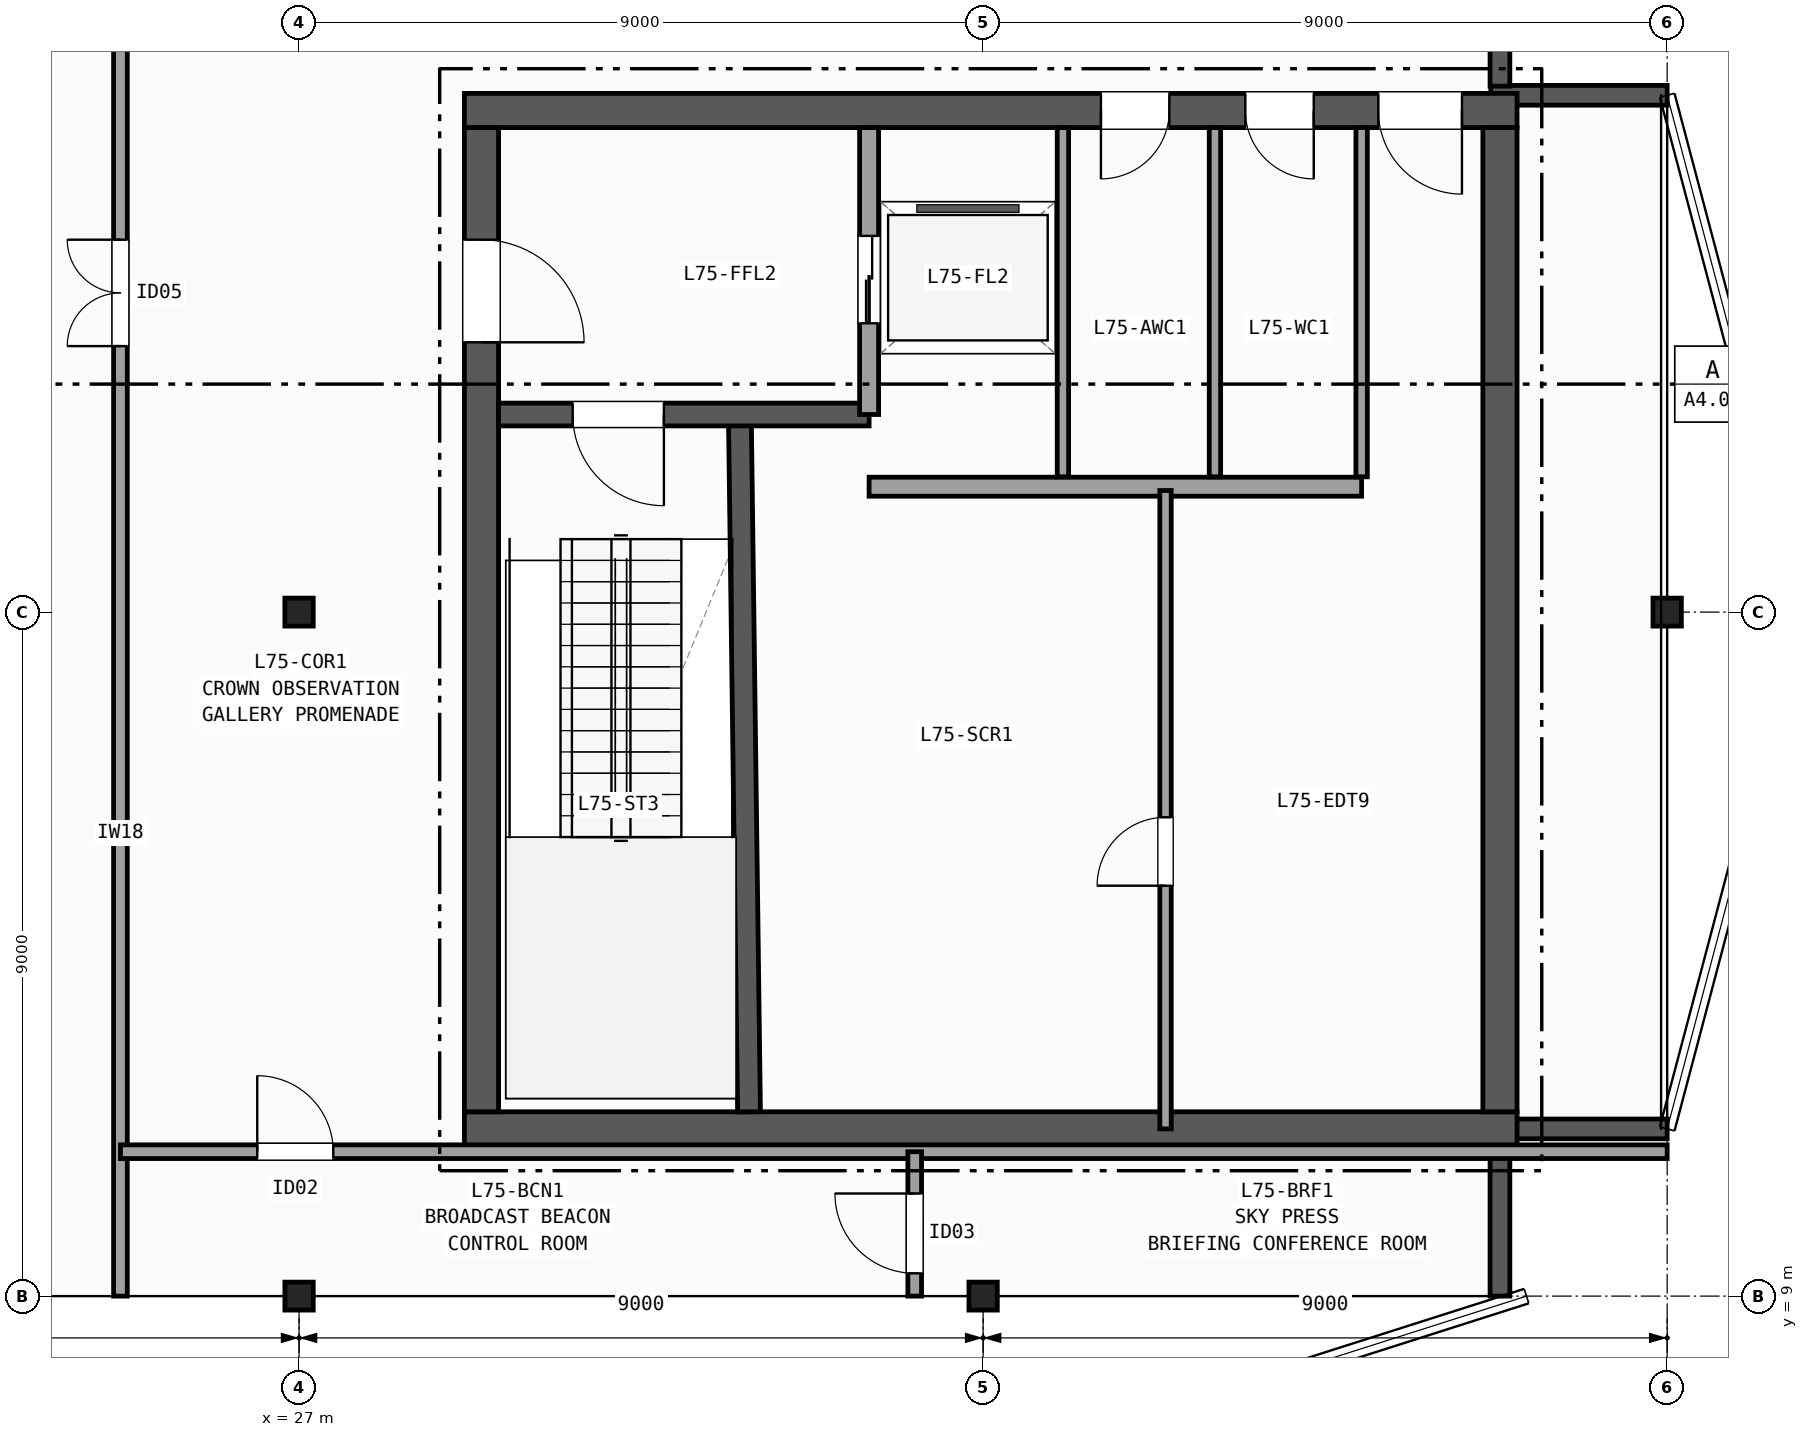
"""IFC4 building model, lengths in metres.
Left out: names, types, materials, properties, quantities, classifications, styles, units other than length and angle.
Written with IfcOpenShell. Run it as: python <this file> out.ifc"""

import sys

from ifc_helpers import new_model, si_unit, direction, frame, frame_2d, origin, origin_2d, place, context, subcontext, project, spatial, rectangle, i_section, extrude, element, fill, save


model = new_model("IFC4")
c1 = context("Model", 3, precision=1e-05, world=origin(), true_north=direction((0.0, 1.0)))
c2 = subcontext(c1, "Body", "Model", "MODEL_VIEW")
j1 = project(units=[si_unit("LENGTHUNIT", "METRE"), si_unit("PLANEANGLEUNIT", "RADIAN")], contexts=[c1])
p1 = place(None, origin())
s1 = spatial("IfcSite", under=j1, at=p1, CompositionType="ELEMENT")
p2 = place(p1, origin())
s2 = spatial("IfcBuilding", under=s1, at=p2, CompositionType="ELEMENT")
p3 = place(p2, frame((0.0, 0.0, 297.4)))
s3 = spatial("IfcBuildingStorey", under=s2, at=p3, CompositionType="ELEMENT", Elevation=297.4)
for number, where, z_axis, x_axis in (
    (1, (27.0, 9.0, 0.0), (0.0, 0.0, 1.0), (1.0, 0.0, 0.0)),
    (2, (27.0, 18.0, 0.0), (0.0, 0.0, 1.0), (1.0, 0.0, 0.0)),
    (3, (36.0, 9.0, 0.0), (0.0, 0.0, 1.0), (1.0, 0.0, 0.0)),
    (4, (45.0, 18.0, 0.0), (0.0, 0.0, 1.0), (1.0, 0.0, 0.0)),
):
    element("IfcColumn", number, at=place(p3, frame(where, z_axis=z_axis, x_axis=x_axis)), inside=s3, PredefinedType="COLUMN", context=c2, shape_type="SweptSolid", body=[
        extrude(i_section(OverallWidth=0.373, OverallDepth=0.368, WebThickness=0.015, FlangeThickness=0.024, FilletRadius=0.015, at=origin_2d()), origin(), (0.0, 0.0, 1.0), 5.2),
    ])
p4 = place(p3, frame((42.8, 9.0, 0.0), z_axis=(0.0, 0.0, 1.0), x_axis=(0.0, 1.0, 0.0)))
e5 = element("IfcWall", 5, at=p4, inside=s3, PredefinedType="SOLIDWALL", context=c2, shape_type="SweptSolid", body=[
    extrude(rectangle(XDim=2.08, YDim=0.26, at=frame_2d((1.04, 0.0))), origin(), (0.0, 0.0, 1.0), 4.87),
])
for number, where, z_axis, x_axis in (
    (6, (42.68, 11.2, 0.0), (0.0, 0.0, 1.0), (1.0, 0.0, 0.0)),
    (7, (45.0, 24.8, 0.0), (0.0, 0.0, 1.0), (-1.0, 0.0, 0.0)),
):
    element("IfcWall", number, at=place(p3, frame(where, z_axis=z_axis, x_axis=x_axis)), inside=s3, PredefinedType="SOLIDWALL", context=c2, shape_type="SweptSolid", body=[
        extrude(rectangle(XDim=2.32, YDim=0.26, at=frame_2d((1.16, 0.0))), origin(), (0.0, 0.0, 1.0), 4.87),
    ])
p5 = place(p3, frame((42.8, 24.92, 0.0), z_axis=(0.0, 0.0, 1.0), x_axis=(0.0, 1.0, 0.0)))
e8 = element("IfcWall", 8, at=p5, inside=s3, PredefinedType="SOLIDWALL", context=c2, shape_type="SweptSolid", body=[
    extrude(rectangle(XDim=2.08, YDim=0.26, at=frame_2d((1.04, 0.0))), origin(), (0.0, 0.0, 1.0), 4.87),
])
p6 = place(p3, frame((29.175, 11.2, 0.0), z_axis=(0.0, 0.0, 1.0), x_axis=(1.0, 0.0, 0.0)))
e9 = element("IfcWall", 9, at=p6, inside=s3, PredefinedType="SHEAR", context=c2, shape_type="SweptSolid", body=[
    extrude(rectangle(XDim=13.85, YDim=0.45, at=frame_2d((6.925, 0.0))), origin(), (0.0, 0.0, 1.0), 4.87),
])
p7 = place(p3, frame((43.025, 24.6, 0.0), z_axis=(0.0, 0.0, 1.0), x_axis=(-1.0, 0.0, 0.0)))
e10 = element("IfcWall", 10, at=p7, inside=s3, PredefinedType="SHEAR", context=c2, shape_type="SweptSolid", body=[
    extrude(rectangle(XDim=13.85, YDim=0.45, at=frame_2d((6.925, 0.0))), origin(), (0.0, 0.0, 1.0), 4.87),
])
p8 = place(p7, frame((0.725, 0.0, 0.0)))
e11 = element("IfcOpeningElement", 11, at=p8, cuts=e10, PredefinedType="OPENING", context=c2, shape_type="SweptSolid", body=[
    extrude(rectangle(XDim=1.1, YDim=2.15, at=frame_2d((0.55, 1.075))), frame((0.0, 0.235, 0.0), z_axis=(0.0, -1.0, 0.0), x_axis=(1.0, 0.0, 0.0)), (0.0, 0.0, 1.0), 0.47),
])
p9 = place(p7, frame((2.675, 0.0, 0.0)))
e12 = element("IfcOpeningElement", 12, at=p9, cuts=e10, PredefinedType="OPENING", context=c2, shape_type="SweptSolid", body=[
    extrude(rectangle(XDim=0.9, YDim=2.1, at=frame_2d((0.45, 1.05))), frame((0.0, 0.235, 0.0), z_axis=(0.0, -1.0, 0.0), x_axis=(1.0, 0.0, 0.0)), (0.0, 0.0, 1.0), 0.47),
])
p10 = place(p7, frame((4.575, 0.0, 0.0)))
e13 = element("IfcOpeningElement", 13, at=p10, cuts=e10, PredefinedType="OPENING", context=c2, shape_type="SweptSolid", body=[
    extrude(rectangle(XDim=0.9, YDim=2.1, at=frame_2d((0.45, 1.05))), frame((0.0, 0.235, 0.0), z_axis=(0.0, -1.0, 0.0), x_axis=(1.0, 0.0, 0.0)), (0.0, 0.0, 1.0), 0.47),
])
p11 = place(p3, frame((29.4, 24.375, 0.0), z_axis=(0.0, 0.0, 1.0), x_axis=(0.0, -1.0, 0.0)))
e14 = element("IfcWall", 14, at=p11, inside=s3, PredefinedType="SHEAR", context=c2, shape_type="SweptSolid", body=[
    extrude(rectangle(XDim=12.95, YDim=0.45, at=frame_2d((6.475, 0.0))), origin(), (0.0, 0.0, 1.0), 4.87),
])
p12 = place(p11, frame((1.475, 0.0, 0.0)))
e15 = element("IfcOpeningElement", 15, at=p12, cuts=e14, PredefinedType="OPENING", context=c2, shape_type="SweptSolid", body=[
    extrude(rectangle(XDim=1.35, YDim=2.15, at=frame_2d((0.675, 1.075))), frame((0.0, 0.235, 0.0), z_axis=(0.0, -1.0, 0.0), x_axis=(1.0, 0.0, 0.0)), (0.0, 0.0, 1.0), 0.47),
])
p13 = place(p3, frame((42.8, 11.425, 0.0), z_axis=(0.0, 0.0, 1.0), x_axis=(0.0, 1.0, 0.0)))
e16 = element("IfcWall", 16, at=p13, inside=s3, PredefinedType="SHEAR", context=c2, shape_type="SweptSolid", body=[
    extrude(rectangle(XDim=12.95, YDim=0.45, at=frame_2d((6.475, 0.0))), origin(), (0.0, 0.0, 1.0), 4.87),
])
p14 = place(p3, frame((32.92, 11.425, 0.0), z_axis=(0.0, 0.0, 1.0), x_axis=(-0.013135638869, 0.999913723774, 0.0)))
e17 = element("IfcWall", 17, at=p14, inside=s3, PredefinedType="SHEAR", context=c2, shape_type="SweptSolid", body=[
    extrude(rectangle(XDim=9.126, YDim=0.3, at=frame_2d((4.563, 0.0))), origin(), (0.0, 0.0, 1.0), 4.87),
])
p15 = place(p3, frame((34.5, 20.6, 0.0), z_axis=(0.0, 0.0, 1.0), x_axis=(-1.0, 0.0, 0.0)))
e18 = element("IfcWall", 18, at=p15, inside=s3, PredefinedType="SHEAR", context=c2, shape_type="SweptSolid", body=[
    extrude(rectangle(XDim=4.875, YDim=0.3, at=frame_2d((2.438, 0.0))), origin(), (0.0, 0.0, 1.0), 4.87),
])
p16 = place(p15, frame((2.7, 0.0, 0.0)))
e19 = element("IfcOpeningElement", 19, at=p16, cuts=e18, PredefinedType="OPENING", context=c2, shape_type="SweptSolid", body=[
    extrude(rectangle(XDim=1.2, YDim=2.15, at=frame_2d((0.6, 1.075))), frame((0.0, 0.16, 0.0), z_axis=(0.0, -1.0, 0.0), x_axis=(1.0, 0.0, 0.0)), (0.0, 0.0, 1.0), 0.32),
])
p17 = place(p3, frame((34.5, 20.6, 0.0), z_axis=(0.0, 0.0, 1.0), x_axis=(0.0, 1.0, 0.0)))
e20 = element("IfcWall", 20, at=p17, inside=s3, PredefinedType="PARTITIONING", context=c2, shape_type="SweptSolid", body=[
    extrude(rectangle(XDim=3.775, YDim=0.25, at=frame_2d((1.887, 0.0))), origin(), (0.0, 0.0, 1.0), 4.87),
])
p18 = place(p17, frame((1.2, 0.0, 0.0)))
e21 = element("IfcOpeningElement", 21, at=p18, cuts=e20, PredefinedType="OPENING", context=c2, shape_type="SweptSolid", body=[
    extrude(rectangle(XDim=1.15, YDim=2.15, at=frame_2d((0.575, 1.075))), frame((0.0, 0.135, 0.0), z_axis=(0.0, -1.0, 0.0), x_axis=(1.0, 0.0, 0.0)), (0.0, 0.0, 1.0), 0.27),
])
p19 = place(p3, frame((34.5, 19.65, 0.0), z_axis=(0.0, 0.0, 1.0), x_axis=(1.0, 0.0, 0.0)))
e22 = element("IfcWall", 22, at=p19, inside=s3, PredefinedType="PARTITIONING", context=c2, shape_type="SweptSolid", body=[
    extrude(rectangle(XDim=6.48, YDim=0.25, at=frame_2d((3.24, 0.0))), origin(), (0.0, 0.0, 1.0), 4.87),
])
p20 = place(p3, frame((38.4, 11.2, 0.0), z_axis=(0.0, 0.0, 1.0), x_axis=(0.0, 1.0, 0.0)))
e23 = element("IfcWall", 23, at=p20, inside=s3, PredefinedType="PARTITIONING", context=c2, shape_type="SweptSolid", body=[
    extrude(rectangle(XDim=8.4, YDim=0.15, at=frame_2d((4.2, 0.0))), origin(), (0.0, 0.0, 1.0), 4.87),
])
p21 = place(p20, frame((3.2, 0.0, 0.0)))
e24 = element("IfcOpeningElement", 24, at=p21, cuts=e23, PredefinedType="OPENING", context=c2, shape_type="SweptSolid", body=[
    extrude(rectangle(XDim=0.9, YDim=2.1, at=frame_2d((0.45, 1.05))), frame((0.0, 0.085, 0.0), z_axis=(0.0, -1.0, 0.0), x_axis=(1.0, 0.0, 0.0)), (0.0, 0.0, 1.0), 0.17),
])
for number, where, z_axis, x_axis in (
    (25, (37.05, 19.78, 0.0), (0.0, 0.0, 1.0), (0.0, 1.0, 0.0)),
    (26, (39.05, 19.78, 0.0), (0.0, 0.0, 1.0), (0.0, 1.0, 0.0)),
    (27, (40.98, 19.78, 0.0), (0.0, 0.0, 1.0), (0.0, 1.0, 0.0)),
):
    element("IfcWall", number, at=place(p3, frame(where, z_axis=z_axis, x_axis=x_axis)), inside=s3, PredefinedType="PARTITIONING", context=c2, shape_type="SweptSolid", body=[
        extrude(rectangle(XDim=4.595, YDim=0.15, at=frame_2d((2.297, 0.0))), origin(), (0.0, 0.0, 1.0), 4.87),
    ])
p22 = place(p3, frame((24.65, 9.0, 0.0), z_axis=(0.0, 0.0, 1.0), x_axis=(0.0, 1.0, 0.0)))
e28 = element("IfcWall", 28, at=p22, inside=s3, PredefinedType="PARTITIONING", context=c2, shape_type="SweptSolid", body=[
    extrude(rectangle(XDim=19.2, YDim=0.18, at=frame_2d((9.6, 0.0))), origin(), (0.0, 0.0, 1.0), 4.157),
])
p23 = place(p22, frame((12.5, 0.0, 0.0)))
e29 = element("IfcOpeningElement", 29, at=p23, cuts=e28, PredefinedType="OPENING", context=c2, shape_type="SweptSolid", body=[
    extrude(rectangle(XDim=1.4, YDim=2.15, at=frame_2d((0.7, 1.075))), frame((0.0, 0.1, 0.0), z_axis=(0.0, -1.0, 0.0), x_axis=(1.0, 0.0, 0.0)), (0.0, 0.0, 1.0), 0.2),
])
p24 = place(p3, frame((24.65, 10.9, 0.0), z_axis=(0.0, 0.0, 1.0), x_axis=(1.0, 0.0, 0.0)))
e30 = element("IfcWall", 30, at=p24, inside=s3, PredefinedType="PARTITIONING", context=c2, shape_type="SweptSolid", body=[
    extrude(rectangle(XDim=20.35, YDim=0.18, at=frame_2d((10.175, 0.0))), origin(), (0.0, 0.0, 1.0), 4.239),
])
p25 = place(p24, frame((1.8, 0.0, 0.0)))
e31 = element("IfcOpeningElement", 31, at=p25, cuts=e30, PredefinedType="OPENING", context=c2, shape_type="SweptSolid", body=[
    extrude(rectangle(XDim=1.0, YDim=2.1, at=frame_2d((0.5, 1.05))), frame((0.0, 0.1, 0.0), z_axis=(0.0, -1.0, 0.0), x_axis=(1.0, 0.0, 0.0)), (0.0, 0.0, 1.0), 0.2),
])
p26 = place(p3, frame((35.1, 9.0, 0.0), z_axis=(0.0, 0.0, 1.0), x_axis=(0.0, 1.0, 0.0)))
e32 = element("IfcWall", 32, at=p26, inside=s3, PredefinedType="PARTITIONING", context=c2, shape_type="SweptSolid", body=[
    extrude(rectangle(XDim=1.9, YDim=0.18, at=frame_2d((0.95, 0.0))), origin(), (0.0, 0.0, 1.0), 4.157),
])
p27 = place(p26, frame((0.3, 0.0, 0.0)))
e33 = element("IfcOpeningElement", 33, at=p27, cuts=e32, PredefinedType="OPENING", context=c2, shape_type="SweptSolid", body=[
    extrude(rectangle(XDim=1.05, YDim=2.15, at=frame_2d((0.525, 1.075))), frame((0.0, 0.1, 0.0), z_axis=(0.0, -1.0, 0.0), x_axis=(1.0, 0.0, 0.0)), (0.0, 0.0, 1.0), 0.2),
])
p28 = place(p16, origin())
e34 = element("IfcDoor", 34, at=p28, inside=s3, OperationType="SINGLE_SWING_LEFT", PredefinedType="DOOR", context=c2, shape_type="SweptSolid", body=[
    extrude(rectangle(XDim=1.2, YDim=2.15, at=frame_2d((0.6, 1.075))), frame((0.0, 0.025, 0.0), z_axis=(0.0, -1.0, 0.0), x_axis=(1.0, 0.0, 0.0)), (0.0, 0.0, 1.0), 0.05),
])
fill(e19, e34)
p29 = place(p12, origin())
e35 = element("IfcDoor", 35, at=p29, inside=s3, OperationType="SINGLE_SWING_RIGHT", PredefinedType="DOOR", context=c2, shape_type="SweptSolid", body=[
    extrude(rectangle(XDim=1.35, YDim=2.15, at=frame_2d((0.675, 1.075))), frame((0.0, 0.025, 0.0), z_axis=(0.0, -1.0, 0.0), x_axis=(1.0, 0.0, 0.0)), (0.0, 0.0, 1.0), 0.05),
])
fill(e15, e35)
p30 = place(p8, origin())
e36 = element("IfcDoor", 36, at=p30, inside=s3, OperationType="SINGLE_SWING_LEFT", PredefinedType="DOOR", context=c2, shape_type="SweptSolid", body=[
    extrude(rectangle(XDim=1.1, YDim=2.15, at=frame_2d((0.55, 1.075))), frame((0.0, 0.025, 0.0), z_axis=(0.0, -1.0, 0.0), x_axis=(1.0, 0.0, 0.0)), (0.0, 0.0, 1.0), 0.05),
])
fill(e11, e36)
p31 = place(p9, origin())
e37 = element("IfcDoor", 37, at=p31, inside=s3, OperationType="SINGLE_SWING_LEFT", PredefinedType="DOOR", context=c2, shape_type="SweptSolid", body=[
    extrude(rectangle(XDim=0.9, YDim=2.1, at=frame_2d((0.45, 1.05))), frame((0.0, 0.025, 0.0), z_axis=(0.0, -1.0, 0.0), x_axis=(1.0, 0.0, 0.0)), (0.0, 0.0, 1.0), 0.05),
])
fill(e12, e37)
p32 = place(p10, origin())
e38 = element("IfcDoor", 38, at=p32, inside=s3, OperationType="SINGLE_SWING_RIGHT", PredefinedType="DOOR", context=c2, shape_type="SweptSolid", body=[
    extrude(rectangle(XDim=0.9, YDim=2.1, at=frame_2d((0.45, 1.05))), frame((0.0, 0.025, 0.0), z_axis=(0.0, -1.0, 0.0), x_axis=(1.0, 0.0, 0.0)), (0.0, 0.0, 1.0), 0.05),
])
fill(e13, e38)
p33 = place(p18, origin())
e39 = element("IfcDoor", 39, at=p33, inside=s3, OperationType="DOUBLE_DOOR_SLIDING", PredefinedType="DOOR", context=c2, shape_type="SweptSolid", body=[
    extrude(rectangle(XDim=1.15, YDim=2.15, at=frame_2d((0.575, 1.075))), frame((0.0, 0.025, 0.0), z_axis=(0.0, -1.0, 0.0), x_axis=(1.0, 0.0, 0.0)), (0.0, 0.0, 1.0), 0.05),
])
fill(e21, e39)
p34 = place(p21, origin())
e40 = element("IfcDoor", 40, at=p34, inside=s3, OperationType="SINGLE_SWING_LEFT", PredefinedType="DOOR", context=c2, shape_type="SweptSolid", body=[
    extrude(rectangle(XDim=0.9, YDim=2.1, at=frame_2d((0.45, 1.05))), frame((0.0, 0.025, 0.0), z_axis=(0.0, -1.0, 0.0), x_axis=(1.0, 0.0, 0.0)), (0.0, 0.0, 1.0), 0.05),
])
fill(e24, e40)
p35 = place(p23, origin())
e41 = element("IfcDoor", 41, at=p35, inside=s3, OperationType="DOUBLE_DOOR_SINGLE_SWING", PredefinedType="DOOR", context=c2, shape_type="SweptSolid", body=[
    extrude(rectangle(XDim=1.4, YDim=2.15, at=frame_2d((0.7, 1.075))), frame((0.0, 0.025, 0.0), z_axis=(0.0, -1.0, 0.0), x_axis=(1.0, 0.0, 0.0)), (0.0, 0.0, 1.0), 0.05),
])
fill(e29, e41)
p36 = place(p25, origin())
e42 = element("IfcDoor", 42, at=p36, inside=s3, OperationType="SINGLE_SWING_LEFT", PredefinedType="DOOR", context=c2, shape_type="SweptSolid", body=[
    extrude(rectangle(XDim=1.0, YDim=2.1, at=frame_2d((0.5, 1.05))), frame((0.0, 0.025, 0.0), z_axis=(0.0, -1.0, 0.0), x_axis=(1.0, 0.0, 0.0)), (0.0, 0.0, 1.0), 0.05),
])
fill(e31, e42)
p37 = place(p27, origin())
e43 = element("IfcDoor", 43, at=p37, inside=s3, OperationType="SINGLE_SWING_RIGHT", PredefinedType="DOOR", context=c2, shape_type="SweptSolid", body=[
    extrude(rectangle(XDim=1.05, YDim=2.15, at=frame_2d((0.525, 1.075))), frame((0.0, 0.025, 0.0), z_axis=(0.0, -1.0, 0.0), x_axis=(1.0, 0.0, 0.0)), (0.0, 0.0, 1.0), 0.05),
])
fill(e33, e43)
save(model, sys.argv[1])
